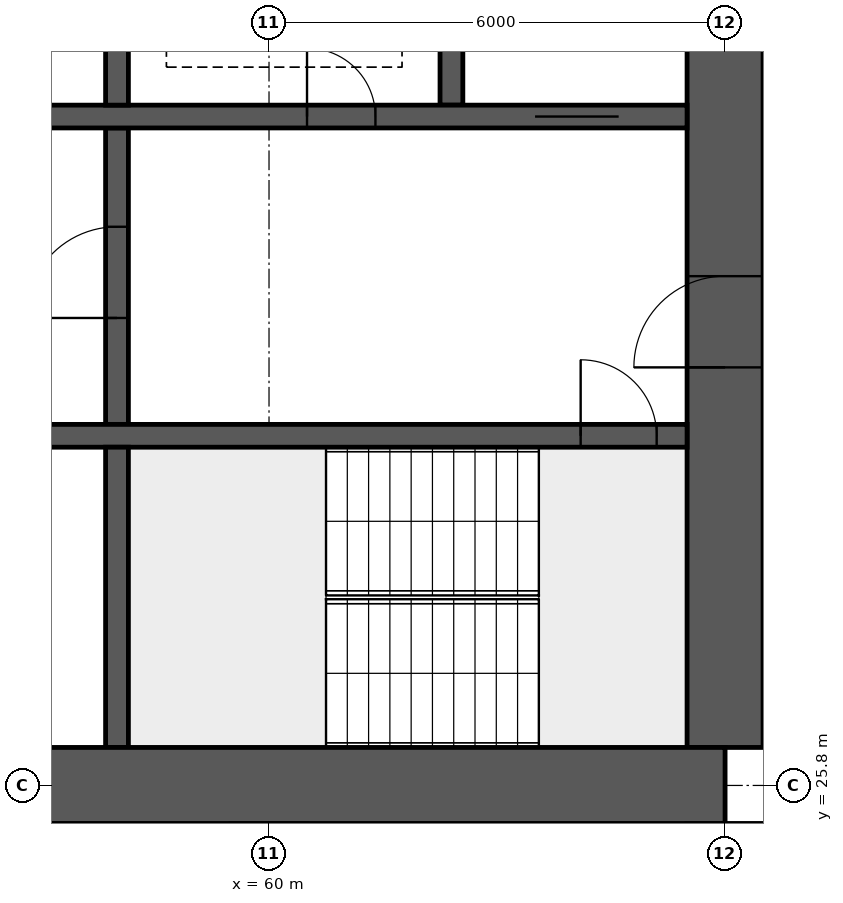
"""IFC4 building model, lengths in metres.
Left out: names, types, materials, properties, quantities, classifications, styles, units other than length and angle.
Written with IfcOpenShell. Run it as: python <this file> out.ifc"""

import sys

from ifc_helpers import new_model, si_unit, direction, frame, frame_2d, origin, place, context, subcontext, project, spatial, rectangle, extrude, element, fill, save


model = new_model("IFC4")
c1 = context("Model", 3, precision=1e-05, world=origin(), true_north=direction((0.0, 1.0)))
c2 = subcontext(c1, "Body", "Model", "MODEL_VIEW")
j1 = project(units=[si_unit("LENGTHUNIT", "METRE"), si_unit("PLANEANGLEUNIT", "RADIAN")], contexts=[c1])
p1 = place(None, origin())
s1 = spatial("IfcSite", under=j1, at=p1, CompositionType="ELEMENT")
p2 = place(p1, origin())
s2 = spatial("IfcBuilding", under=s1, at=p2, CompositionType="ELEMENT")
p3 = place(p2, frame((0.0, 0.0, 20.2)))
s3 = spatial("IfcBuildingStorey", under=s2, at=p3, CompositionType="ELEMENT", Elevation=20.2)
p4 = place(p3, frame((18.0, 25.8, 0.0), z_axis=(0.0, 0.0, 1.0), x_axis=(1.0, 0.0, 0.0)))
e1 = element("IfcWall", 1, at=p4, inside=s3, PredefinedType="SHEAR", context=c2, shape_type="SweptSolid", body=[
    extrude(rectangle(XDim=48.0, YDim=1.0, at=frame_2d((24.0, 0.0))), origin(), (0.0, 0.0, 1.0), 3.75),
])
p5 = place(p3, frame((66.0, 26.3, 0.0), z_axis=(0.0, 0.0, 1.0), x_axis=(0.0, 1.0, 0.0)))
e2 = element("IfcWall", 2, at=p5, inside=s3, PredefinedType="SHEAR", context=c2, shape_type="SweptSolid", body=[
    extrude(rectangle(XDim=11.4, YDim=1.0, at=frame_2d((5.7, 0.0))), origin(), (0.0, 0.0, 1.0), 3.75),
])
p6 = place(p5, frame((5.0, 0.0, 0.0)))
e3 = element("IfcOpeningElement", 3, at=p6, cuts=e2, PredefinedType="OPENING", context=c2, shape_type="SweptSolid", body=[
    extrude(rectangle(XDim=1.2, YDim=2.1, at=frame_2d((0.6, 1.05))), frame((0.0, 0.51, 0.0), z_axis=(0.0, -1.0, 0.0), x_axis=(1.0, 0.0, 0.0)), (0.0, 0.0, 1.0), 1.02),
])
p7 = place(p3, frame((18.5, 30.4, 0.0), z_axis=(0.0, 0.0, 1.0), x_axis=(1.0, 0.0, 0.0)))
e4 = element("IfcWall", 4, at=p7, inside=s3, PredefinedType="SHEAR", context=c2, shape_type="SweptSolid", body=[
    extrude(rectangle(XDim=47.0, YDim=0.3, at=frame_2d((23.5, 0.0))), origin(), (0.0, 0.0, 1.0), 3.75),
])
p8 = place(p7, frame((0.4, 0.0, 0.0)))
e5 = element("IfcOpeningElement", 5, at=p8, cuts=e4, PredefinedType="OPENING", context=c2, shape_type="SweptSolid", body=[
    extrude(rectangle(XDim=1.0, YDim=2.1, at=frame_2d((0.5, 1.05))), frame((0.0, 0.16, 0.0), z_axis=(0.0, -1.0, 0.0), x_axis=(1.0, 0.0, 0.0)), (0.0, 0.0, 1.0), 0.32),
])
p9 = place(p7, frame((45.6, 0.0, 0.0)))
e6 = element("IfcOpeningElement", 6, at=p9, cuts=e4, PredefinedType="OPENING", context=c2, shape_type="SweptSolid", body=[
    extrude(rectangle(XDim=1.0, YDim=2.1, at=frame_2d((0.5, 1.05))), frame((0.0, 0.16, 0.0), z_axis=(0.0, -1.0, 0.0), x_axis=(1.0, 0.0, 0.0)), (0.0, 0.0, 1.0), 0.32),
])
p10 = place(p7, frame((8.25, 0.0, 0.0)))
e7 = element("IfcOpeningElement", 7, at=p10, cuts=e4, PredefinedType="OPENING", context=c2, shape_type="SweptSolid", body=[
    extrude(rectangle(XDim=1.1, YDim=2.1, at=frame_2d((0.55, 1.05))), frame((0.0, 0.16, 0.0), z_axis=(0.0, -1.0, 0.0), x_axis=(1.0, 0.0, 0.0)), (0.0, 0.0, 1.0), 0.32),
])
p11 = place(p7, frame((10.85, 0.0, 0.0)))
e8 = element("IfcOpeningElement", 8, at=p11, cuts=e4, PredefinedType="OPENING", context=c2, shape_type="SweptSolid", body=[
    extrude(rectangle(XDim=1.1, YDim=2.1, at=frame_2d((0.55, 1.05))), frame((0.0, 0.16, 0.0), z_axis=(0.0, -1.0, 0.0), x_axis=(1.0, 0.0, 0.0)), (0.0, 0.0, 1.0), 0.32),
])
p12 = place(p7, frame((13.45, 0.0, 0.0)))
e9 = element("IfcOpeningElement", 9, at=p12, cuts=e4, PredefinedType="OPENING", context=c2, shape_type="SweptSolid", body=[
    extrude(rectangle(XDim=1.1, YDim=2.1, at=frame_2d((0.55, 1.05))), frame((0.0, 0.16, 0.0), z_axis=(0.0, -1.0, 0.0), x_axis=(1.0, 0.0, 0.0)), (0.0, 0.0, 1.0), 0.32),
])
p13 = place(p7, frame((16.05, 0.0, 0.0)))
e10 = element("IfcOpeningElement", 10, at=p13, cuts=e4, PredefinedType="OPENING", context=c2, shape_type="SweptSolid", body=[
    extrude(rectangle(XDim=1.1, YDim=2.1, at=frame_2d((0.55, 1.05))), frame((0.0, 0.16, 0.0), z_axis=(0.0, -1.0, 0.0), x_axis=(1.0, 0.0, 0.0)), (0.0, 0.0, 1.0), 0.32),
])
p14 = place(p7, frame((30.117, 0.0, 0.0)))
e11 = element("IfcOpeningElement", 11, at=p14, cuts=e4, PredefinedType="OPENING", context=c2, shape_type="SweptSolid", body=[
    extrude(rectangle(XDim=1.1, YDim=2.1, at=frame_2d((0.55, 1.05))), frame((0.0, 0.16, 0.0), z_axis=(0.0, -1.0, 0.0), x_axis=(1.0, 0.0, 0.0)), (0.0, 0.0, 1.0), 0.32),
])
p15 = place(p7, frame((33.65, 0.0, 0.0)))
e12 = element("IfcOpeningElement", 12, at=p15, cuts=e4, PredefinedType="OPENING", context=c2, shape_type="SweptSolid", body=[
    extrude(rectangle(XDim=1.1, YDim=2.1, at=frame_2d((0.55, 1.05))), frame((0.0, 0.16, 0.0), z_axis=(0.0, -1.0, 0.0), x_axis=(1.0, 0.0, 0.0)), (0.0, 0.0, 1.0), 0.32),
])
p16 = place(p7, frame((37.183, 0.0, 0.0)))
e13 = element("IfcOpeningElement", 13, at=p16, cuts=e4, PredefinedType="OPENING", context=c2, shape_type="SweptSolid", body=[
    extrude(rectangle(XDim=1.1, YDim=2.1, at=frame_2d((0.55, 1.05))), frame((0.0, 0.16, 0.0), z_axis=(0.0, -1.0, 0.0), x_axis=(1.0, 0.0, 0.0)), (0.0, 0.0, 1.0), 0.32),
])
p17 = place(p3, frame((18.5, 34.6, 0.0), z_axis=(0.0, 0.0, 1.0), x_axis=(1.0, 0.0, 0.0)))
e14 = element("IfcWall", 14, at=p17, inside=s3, PredefinedType="SHEAR", context=c2, shape_type="SweptSolid", body=[
    extrude(rectangle(XDim=47.0, YDim=0.3, at=frame_2d((23.5, 0.0))), origin(), (0.0, 0.0, 1.0), 3.75),
])
p18 = place(p17, frame((0.9, 0.0, 0.0)))
e15 = element("IfcOpeningElement", 15, at=p18, cuts=e14, PredefinedType="OPENING", context=c2, shape_type="SweptSolid", body=[
    extrude(rectangle(XDim=1.1, YDim=2.1, at=frame_2d((0.55, 1.05))), frame((0.0, 0.16, 0.0), z_axis=(0.0, -1.0, 0.0), x_axis=(1.0, 0.0, 0.0)), (0.0, 0.0, 1.0), 0.32),
])
p19 = place(p17, frame((45.0, 0.0, 0.0)))
e16 = element("IfcOpeningElement", 16, at=p19, cuts=e14, PredefinedType="OPENING", context=c2, shape_type="SweptSolid", body=[
    extrude(rectangle(XDim=1.1, YDim=2.1, at=frame_2d((0.55, 1.05))), frame((0.0, 0.16, 0.0), z_axis=(0.0, -1.0, 0.0), x_axis=(1.0, 0.0, 0.0)), (0.0, 0.0, 1.0), 0.32),
])
p20 = place(p17, frame((4.1, 0.0, 0.0)))
e17 = element("IfcOpeningElement", 17, at=p20, cuts=e14, PredefinedType="OPENING", context=c2, shape_type="SweptSolid", body=[
    extrude(rectangle(XDim=0.9, YDim=2.1, at=frame_2d((0.45, 1.05))), frame((0.0, 0.16, 0.0), z_axis=(0.0, -1.0, 0.0), x_axis=(1.0, 0.0, 0.0)), (0.0, 0.0, 1.0), 0.32),
])
p21 = place(p17, frame((42.0, 0.0, 0.0)))
e18 = element("IfcOpeningElement", 18, at=p21, cuts=e14, PredefinedType="OPENING", context=c2, shape_type="SweptSolid", body=[
    extrude(rectangle(XDim=0.9, YDim=2.1, at=frame_2d((0.45, 1.05))), frame((0.0, 0.16, 0.0), z_axis=(0.0, -1.0, 0.0), x_axis=(1.0, 0.0, 0.0)), (0.0, 0.0, 1.0), 0.32),
])
p22 = place(p17, frame((8.875, 0.0, 0.0)))
e19 = element("IfcOpeningElement", 19, at=p22, cuts=e14, PredefinedType="OPENING", context=c2, shape_type="SweptSolid", body=[
    extrude(rectangle(XDim=0.9, YDim=2.1, at=frame_2d((0.45, 1.05))), frame((0.0, 0.16, 0.0), z_axis=(0.0, -1.0, 0.0), x_axis=(1.0, 0.0, 0.0)), (0.0, 0.0, 1.0), 0.32),
])
p23 = place(p17, frame((12.849, 0.0, 0.0)))
e20 = element("IfcOpeningElement", 20, at=p23, cuts=e14, PredefinedType="OPENING", context=c2, shape_type="SweptSolid", body=[
    extrude(rectangle(XDim=0.9, YDim=2.1, at=frame_2d((0.45, 1.05))), frame((0.0, 0.16, 0.0), z_axis=(0.0, -1.0, 0.0), x_axis=(1.0, 0.0, 0.0)), (0.0, 0.0, 1.0), 0.32),
])
p24 = place(p17, frame((16.496, 0.0, 0.0)))
e21 = element("IfcOpeningElement", 21, at=p24, cuts=e14, PredefinedType="OPENING", context=c2, shape_type="SweptSolid", body=[
    extrude(rectangle(XDim=0.9, YDim=2.1, at=frame_2d((0.45, 1.05))), frame((0.0, 0.16, 0.0), z_axis=(0.0, -1.0, 0.0), x_axis=(1.0, 0.0, 0.0)), (0.0, 0.0, 1.0), 0.32),
])
p25 = place(p17, frame((20.255, 0.0, 0.0)))
e22 = element("IfcOpeningElement", 22, at=p25, cuts=e14, PredefinedType="OPENING", context=c2, shape_type="SweptSolid", body=[
    extrude(rectangle(XDim=0.9, YDim=2.1, at=frame_2d((0.45, 1.05))), frame((0.0, 0.16, 0.0), z_axis=(0.0, -1.0, 0.0), x_axis=(1.0, 0.0, 0.0)), (0.0, 0.0, 1.0), 0.32),
])
p26 = place(p17, frame((24.661, 0.0, 0.0)))
e23 = element("IfcOpeningElement", 23, at=p26, cuts=e14, PredefinedType="OPENING", context=c2, shape_type="SweptSolid", body=[
    extrude(rectangle(XDim=0.9, YDim=2.1, at=frame_2d((0.45, 1.05))), frame((0.0, 0.16, 0.0), z_axis=(0.0, -1.0, 0.0), x_axis=(1.0, 0.0, 0.0)), (0.0, 0.0, 1.0), 0.32),
])
p27 = place(p17, frame((27.458, 0.0, 0.0)))
e24 = element("IfcOpeningElement", 24, at=p27, cuts=e14, PredefinedType="OPENING", context=c2, shape_type="SweptSolid", body=[
    extrude(rectangle(XDim=0.9, YDim=2.1, at=frame_2d((0.45, 1.05))), frame((0.0, 0.16, 0.0), z_axis=(0.0, -1.0, 0.0), x_axis=(1.0, 0.0, 0.0)), (0.0, 0.0, 1.0), 0.32),
])
p28 = place(p17, frame((29.831, 0.0, 0.0)))
e25 = element("IfcOpeningElement", 25, at=p28, cuts=e14, PredefinedType="OPENING", context=c2, shape_type="SweptSolid", body=[
    extrude(rectangle(XDim=0.9, YDim=2.1, at=frame_2d((0.45, 1.05))), frame((0.0, 0.16, 0.0), z_axis=(0.0, -1.0, 0.0), x_axis=(1.0, 0.0, 0.0)), (0.0, 0.0, 1.0), 0.32),
])
p29 = place(p17, frame((33.68, 0.0, 0.0)))
e26 = element("IfcOpeningElement", 26, at=p29, cuts=e14, PredefinedType="OPENING", context=c2, shape_type="SweptSolid", body=[
    extrude(rectangle(XDim=0.9, YDim=2.1, at=frame_2d((0.45, 1.05))), frame((0.0, 0.16, 0.0), z_axis=(0.0, -1.0, 0.0), x_axis=(1.0, 0.0, 0.0)), (0.0, 0.0, 1.0), 0.32),
])
p30 = place(p17, frame((37.429, 0.0, 0.0)))
e27 = element("IfcOpeningElement", 27, at=p30, cuts=e14, PredefinedType="OPENING", context=c2, shape_type="SweptSolid", body=[
    extrude(rectangle(XDim=0.9, YDim=2.1, at=frame_2d((0.45, 1.05))), frame((0.0, 0.16, 0.0), z_axis=(0.0, -1.0, 0.0), x_axis=(1.0, 0.0, 0.0)), (0.0, 0.0, 1.0), 0.32),
])
p31 = place(p3, frame((58.0, 26.3, 0.0), z_axis=(0.0, 0.0, 1.0), x_axis=(0.0, 1.0, 0.0)))
e28 = element("IfcWall", 28, at=p31, inside=s3, PredefinedType="SHEAR", context=c2, shape_type="SweptSolid", body=[
    extrude(rectangle(XDim=3.95, YDim=0.3, at=frame_2d((1.975, 0.0))), origin(), (0.0, 0.0, 1.0), 3.75),
])
p32 = place(p3, frame((58.0, 30.55, 0.0), z_axis=(0.0, 0.0, 1.0), x_axis=(0.0, 1.0, 0.0)))
e29 = element("IfcWall", 29, at=p32, inside=s3, PredefinedType="SHEAR", context=c2, shape_type="SweptSolid", body=[
    extrude(rectangle(XDim=3.9, YDim=0.3, at=frame_2d((1.95, 0.0))), origin(), (0.0, 0.0, 1.0), 3.75),
])
p33 = place(p32, frame((1.4, 0.0, 0.0)))
e30 = element("IfcOpeningElement", 30, at=p33, cuts=e29, PredefinedType="OPENING", context=c2, shape_type="SweptSolid", body=[
    extrude(rectangle(XDim=1.2, YDim=2.1, at=frame_2d((0.6, 1.05))), frame((0.0, 0.16, 0.0), z_axis=(0.0, -1.0, 0.0), x_axis=(1.0, 0.0, 0.0)), (0.0, 0.0, 1.0), 0.32),
])
for number, where, z_axis, x_axis in (
    (31, (62.4, 34.75, 0.0), (0.0, 0.0, 1.0), (0.0, 1.0, 0.0)),
    (32, (58.0, 34.75, 0.0), (0.0, 0.0, 1.0), (0.0, 1.0, 0.0)),
):
    element("IfcWall", number, at=place(p3, frame(where, z_axis=z_axis, x_axis=x_axis)), inside=s3, PredefinedType="SHEAR", context=c2, shape_type="SweptSolid", body=[
        extrude(rectangle(XDim=2.95, YDim=0.3, at=frame_2d((1.475, 0.0))), origin(), (0.0, 0.0, 1.0), 3.75),
    ])
p34 = place(p3, frame((57.6, 14.9, 0.0), z_axis=(0.0, 0.0, 1.0), x_axis=(0.0, 1.0, 0.0)))
e33 = element("IfcWall", 33, at=p34, inside=s3, PredefinedType="PARTITIONING", context=c2, shape_type="SweptSolid", body=[
    extrude(rectangle(XDim=10.4, YDim=0.15, at=frame_2d((5.2, 0.0))), origin(), (0.0, 0.0, 1.0), 3.3),
])
p35 = place(p6, origin())
e34 = element("IfcDoor", 34, at=p35, inside=s3, OperationType="SINGLE_SWING_LEFT", PredefinedType="DOOR", context=c2, shape_type="SweptSolid", body=[
    extrude(rectangle(XDim=1.2, YDim=2.1, at=frame_2d((0.6, 1.05))), frame((0.0, 0.025, 0.0), z_axis=(0.0, -1.0, 0.0), x_axis=(1.0, 0.0, 0.0)), (0.0, 0.0, 1.0), 0.05),
])
fill(e3, e34)
p36 = place(p9, origin())
e35 = element("IfcDoor", 35, at=p36, inside=s3, OperationType="SINGLE_SWING_LEFT", PredefinedType="DOOR", context=c2, shape_type="SweptSolid", body=[
    extrude(rectangle(XDim=1.0, YDim=2.1, at=frame_2d((0.5, 1.05))), frame((0.0, 0.025, 0.0), z_axis=(0.0, -1.0, 0.0), x_axis=(1.0, 0.0, 0.0)), (0.0, 0.0, 1.0), 0.05),
])
fill(e6, e35)
p37 = place(p19, origin())
e36 = element("IfcDoor", 36, at=p37, inside=s3, OperationType="DOUBLE_DOOR_SLIDING", PredefinedType="DOOR", context=c2, shape_type="SweptSolid", body=[
    extrude(rectangle(XDim=1.1, YDim=2.1, at=frame_2d((0.55, 1.05))), frame((0.0, 0.025, 0.0), z_axis=(0.0, -1.0, 0.0), x_axis=(1.0, 0.0, 0.0)), (0.0, 0.0, 1.0), 0.05),
])
fill(e16, e36)
p38 = place(p21, origin())
e37 = element("IfcDoor", 37, at=p38, inside=s3, OperationType="SINGLE_SWING_LEFT", PredefinedType="DOOR", context=c2, shape_type="SweptSolid", body=[
    extrude(rectangle(XDim=0.9, YDim=2.1, at=frame_2d((0.45, 1.05))), frame((0.0, 0.025, 0.0), z_axis=(0.0, -1.0, 0.0), x_axis=(1.0, 0.0, 0.0)), (0.0, 0.0, 1.0), 0.05),
])
fill(e18, e37)
p39 = place(p33, origin())
e38 = element("IfcDoor", 38, at=p39, inside=s3, OperationType="SINGLE_SWING_LEFT", PredefinedType="DOOR", context=c2, shape_type="SweptSolid", body=[
    extrude(rectangle(XDim=1.2, YDim=2.1, at=frame_2d((0.6, 1.05))), frame((0.0, 0.025, 0.0), z_axis=(0.0, -1.0, 0.0), x_axis=(1.0, 0.0, 0.0)), (0.0, 0.0, 1.0), 0.05),
])
fill(e30, e38)
save(model, sys.argv[1])
